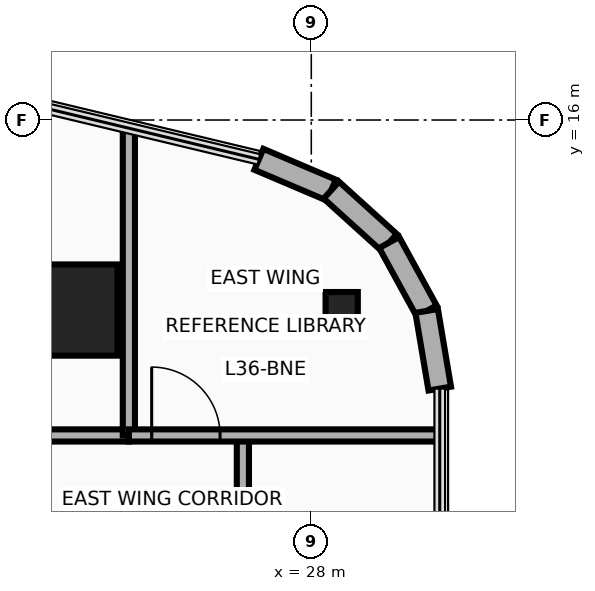
"""IFC4 building model, lengths in metres.
Left out: names, types, materials, properties, quantities, classifications, styles, units other than length and angle.
Written with IfcOpenShell. Run it as: python <this file> out.ifc"""

import sys

from ifc_helpers import new_model, si_unit, direction, frame, frame_2d, origin, origin_2d, place, context, subcontext, project, spatial, rectangle, i_section, extrude, source, transform, mapped, element, fill, save


model = new_model("IFC4")
c1 = context("Model", 3, precision=1e-05, world=origin(), true_north=direction((0.0, 1.0)))
c2 = subcontext(c1, "Body", "Model", "MODEL_VIEW")
j1 = project(units=[si_unit("LENGTHUNIT", "METRE"), si_unit("PLANEANGLEUNIT", "RADIAN")], contexts=[c1])
p1 = place(None, origin())
s1 = spatial("IfcSite", under=j1, at=p1, CompositionType="ELEMENT")
p2 = place(p1, origin())
s2 = spatial("IfcBuilding", under=s1, at=p2, CompositionType="ELEMENT")
p3 = place(p2, frame((0.0, 0.0, 142.7)))
s3 = spatial("IfcBuildingStorey", under=s2, at=p3, CompositionType="ELEMENT", Elevation=142.7)
m1 = source(origin(), c2, "Body", "SweptSolid", [
    extrude(rectangle(XDim=1.2, YDim=1.2, at=origin_2d()), origin(), (0.0, 0.0, 1.0), 3.7),
])
p4 = place(p3, frame((24.85, 13.5, 0.0), z_axis=(0.0, 0.0, 1.0), x_axis=(1.0, 0.0, 0.0)))
e1 = element("IfcColumn", 1, at=p4, inside=s3, PredefinedType="COLUMN", context=c2, shape_type="MappedRepresentation", body=[
    mapped(m1, transform((0.0, 0.0, 0.0), x_axis=(1.0, 0.0, 0.0), y_axis=(0.0, 1.0, 0.0), z_axis=(0.0, 0.0, 1.0), scale=1.0)),
])
m2 = source(origin(), c2, "Body", "SweptSolid", [
    extrude(i_section(OverallWidth=0.424, OverallDepth=0.474, WebThickness=0.048, FlangeThickness=0.077, at=origin_2d()), origin(), (0.0, 0.0, 1.0), 3.7),
])
p5 = place(p3, frame((28.4, 13.5, 0.0), z_axis=(0.0, 0.0, 1.0), x_axis=(1.0, 0.0, 0.0)))
e2 = element("IfcColumn", 2, at=p5, inside=s3, PredefinedType="COLUMN", context=c2, shape_type="MappedRepresentation", body=[
    mapped(m2, transform((0.0, 0.0, 0.0), x_axis=(1.0, 0.0, 0.0), y_axis=(0.0, 1.0, 0.0), z_axis=(0.0, 0.0, 1.0), scale=1.0)),
])
p6 = place(p3, frame((27.31, 15.483, 0.0), z_axis=(0.0, 0.0, 1.0), x_axis=(0.920250328759, -0.391330208927, 0.0)))
e3 = element("IfcWall", 3, at=p6, inside=s3, PredefinedType="SOLIDWALL", context=c2, shape_type="SweptSolid", body=[
    extrude(rectangle(XDim=1.036, YDim=0.3, at=frame_2d((0.518, 0.0))), origin(), (0.0, 0.0, 1.0), 3.46),
])
p7 = place(p3, frame((28.264, 15.077, 0.0), z_axis=(0.0, 0.0, 1.0), x_axis=(0.741208839713, -0.671274501178, 0.0)))
e4 = element("IfcWall", 4, at=p7, inside=s3, PredefinedType="SOLIDWALL", context=c2, shape_type="SweptSolid", body=[
    extrude(rectangle(XDim=1.026, YDim=0.3, at=frame_2d((0.513, 0.0))), origin(), (0.0, 0.0, 1.0), 3.46),
])
p8 = place(p3, frame((29.025, 14.388, 0.0), z_axis=(0.0, 0.0, 1.0), x_axis=(0.480284137298, -0.87711296163, 0.0)))
e5 = element("IfcWall", 5, at=p8, inside=s3, PredefinedType="SOLIDWALL", context=c2, shape_type="SweptSolid", body=[
    extrude(rectangle(XDim=1.027, YDim=0.3, at=frame_2d((0.513, 0.0))), origin(), (0.0, 0.0, 1.0), 3.46),
])
p9 = place(p3, frame((29.518, 13.488, 0.0), z_axis=(0.0, 0.0, 1.0), x_axis=(0.166156796952, -0.986099345313, 0.0)))
e6 = element("IfcWall", 6, at=p9, inside=s3, PredefinedType="SOLIDWALL", context=c2, shape_type="SweptSolid", body=[
    extrude(rectangle(XDim=1.036, YDim=0.3, at=frame_2d((0.518, 0.0))), origin(), (0.0, 0.0, 1.0), 3.46),
])
p10 = place(p3, frame((15.4, 11.85, 0.0), z_axis=(0.0, 0.0, 1.0), x_axis=(1.0, 0.0, 0.0)))
e7 = element("IfcWall", 7, at=p10, inside=s3, PredefinedType="PARTITIONING", context=c2, shape_type="SweptSolid", body=[
    extrude(rectangle(XDim=10.2, YDim=0.16, at=frame_2d((5.1, 0.0))), origin(), (0.0, 0.0, 1.0), 2.834),
])
p11 = place(p10, frame((4.65, 0.0, 0.0)))
e8 = element("IfcOpeningElement", 8, at=p11, cuts=e7, PredefinedType="OPENING", context=c2, shape_type="SweptSolid", body=[
    extrude(rectangle(XDim=0.9, YDim=2.1, at=frame_2d((0.45, 1.05))), frame((0.0, 0.095, 0.0), z_axis=(0.0, -1.0, 0.0), x_axis=(1.0, 0.0, 0.0)), (0.0, 0.0, 1.0), 0.19),
])
p12 = place(p3, frame((25.6, 11.85, 0.0), z_axis=(0.0, 0.0, 1.0), x_axis=(0.0, 1.0, 0.0)))
e9 = element("IfcWall", 9, at=p12, inside=s3, PredefinedType="PARTITIONING", context=c2, shape_type="SweptSolid", body=[
    extrude(rectangle(XDim=4.042, YDim=0.16, at=frame_2d((2.021, 0.0))), origin(), (0.0, 0.0, 1.0), 2.666),
])
p13 = place(p3, frame((27.1, -11.661, 0.0), z_axis=(0.0, 0.0, 1.0), x_axis=(0.0, 1.0, 0.0)))
e10 = element("IfcWall", 10, at=p13, inside=s3, PredefinedType="PARTITIONING", context=c2, shape_type="SweptSolid", body=[
    extrude(rectangle(XDim=23.511, YDim=0.16, at=frame_2d((11.755, 0.0))), origin(), (0.0, 0.0, 1.0), 2.666),
])
p14 = place(p13, frame((4.593, 0.0, 0.0)))
e11 = element("IfcOpeningElement", 11, at=p14, cuts=e10, PredefinedType="OPENING", context=c2, shape_type="SweptSolid", body=[
    extrude(rectangle(XDim=0.9, YDim=2.1, at=frame_2d((0.45, 1.05))), frame((0.0, 0.095, 0.0), z_axis=(0.0, -1.0, 0.0), x_axis=(1.0, 0.0, 0.0)), (0.0, 0.0, 1.0), 0.19),
])
p15 = place(p13, frame((16.348, 0.0, 0.0)))
e12 = element("IfcOpeningElement", 12, at=p15, cuts=e10, PredefinedType="OPENING", context=c2, shape_type="SweptSolid", body=[
    extrude(rectangle(XDim=0.9, YDim=2.1, at=frame_2d((0.45, 1.05))), frame((0.0, 0.095, 0.0), z_axis=(0.0, -1.0, 0.0), x_axis=(1.0, 0.0, 0.0)), (0.0, 0.0, 1.0), 0.19),
])
p16 = place(p3, frame((25.6, 11.85, 0.0), z_axis=(0.0, 0.0, 1.0), x_axis=(1.0, 0.0, 0.0)))
e13 = element("IfcWall", 13, at=p16, inside=s3, PredefinedType="PARTITIONING", context=c2, shape_type="SweptSolid", body=[
    extrude(rectangle(XDim=4.09, YDim=0.16, at=frame_2d((2.045, 0.0))), origin(), (0.0, 0.0, 1.0), 2.896),
])
p17 = place(p16, frame((0.3, 0.0, 0.0)))
e14 = element("IfcOpeningElement", 14, at=p17, cuts=e13, PredefinedType="OPENING", context=c2, shape_type="SweptSolid", body=[
    extrude(rectangle(XDim=0.9, YDim=2.1, at=frame_2d((0.45, 1.05))), frame((0.0, 0.095, 0.0), z_axis=(0.0, -1.0, 0.0), x_axis=(1.0, 0.0, 0.0)), (0.0, 0.0, 1.0), 0.19),
])
p18 = place(p17, origin())
e15 = element("IfcDoor", 15, at=p18, inside=s3, OperationType="SINGLE_SWING_LEFT", PredefinedType="DOOR", context=c2, shape_type="SweptSolid", body=[
    extrude(rectangle(XDim=0.9, YDim=2.1, at=frame_2d((0.45, 1.05))), frame((0.0, 0.025, 0.0), z_axis=(0.0, -1.0, 0.0), x_axis=(1.0, 0.0, 0.0)), (0.0, 0.0, 1.0), 0.05),
])
fill(e14, e15)
save(model, sys.argv[1])
